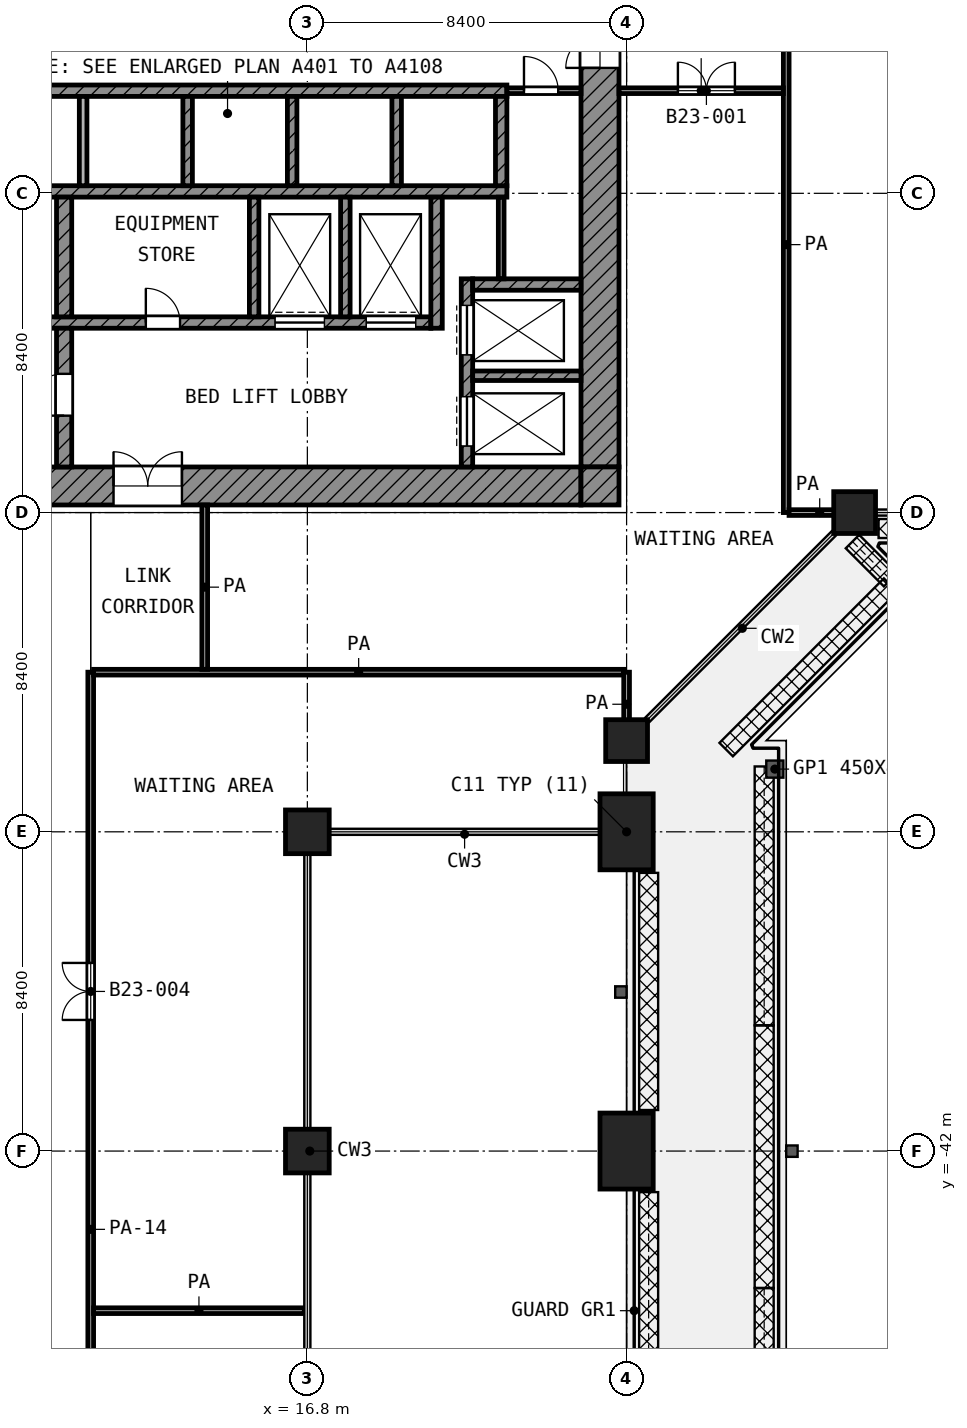
"""IFC4 building model, lengths in metres.
Left out: names, types, materials, properties, quantities, classifications, styles, units other than length and angle.
Written with IfcOpenShell. Run it as: python <this file> out.ifc"""

import sys

from ifc_helpers import new_model, si_unit, direction, frame, frame_2d, origin, origin_2d, place, context, subcontext, project, spatial, rectangle, extrude, element, fill, save


model = new_model("IFC4")
c1 = context("Model", 3, precision=1e-05, world=origin(), true_north=direction((0.0, 1.0)))
c2 = subcontext(c1, "Body", "Model", "MODEL_VIEW")
j1 = project(units=[si_unit("LENGTHUNIT", "METRE"), si_unit("PLANEANGLEUNIT", "RADIAN")], contexts=[c1])
p1 = place(None, origin())
s1 = spatial("IfcSite", under=j1, at=p1, CompositionType="ELEMENT")
p2 = place(p1, origin())
s2 = spatial("IfcBuilding", under=s1, at=p2, CompositionType="ELEMENT")
p3 = place(p2, frame((0.0, 0.0, 103.0)))
s3 = spatial("IfcBuildingStorey", under=s2, at=p3, CompositionType="ELEMENT", Elevation=103.0)
for number, where, z_axis, x_axis in (
    (1, (31.2, -25.2, 0.0), (0.0, 0.0, 1.0), (1.0, 0.0, 0.0)),
    (2, (25.2, -31.2, 0.0), (0.0, 0.0, 1.0), (1.0, 0.0, 0.0)),
):
    element("IfcColumn", number, at=place(p3, frame(where, z_axis=z_axis, x_axis=x_axis)), inside=s3, PredefinedType="COLUMN", context=c2, shape_type="SweptSolid", body=[
        extrude(rectangle(XDim=1.1, YDim=1.1, at=origin_2d()), origin(), (0.0, 0.0, 1.0), 4.2),
    ])
for number, where, z_axis, x_axis in (
    (3, (16.8, -33.6, 0.0), (0.0, 0.0, 1.0), (1.0, 0.0, 0.0)),
    (4, (16.8, -42.0, 0.0), (0.0, 0.0, 1.0), (1.0, 0.0, 0.0)),
):
    element("IfcColumn", number, at=place(p3, frame(where, z_axis=z_axis, x_axis=x_axis)), inside=s3, PredefinedType="COLUMN", context=c2, shape_type="SweptSolid", body=[
        extrude(rectangle(XDim=1.15, YDim=1.15, at=origin_2d()), origin(), (0.0, 0.0, 1.0), 4.2),
    ])
for number, where, z_axis, x_axis in (
    (5, (25.2, -42.0, 0.0), (0.0, 0.0, 1.0), (0.0, -1.0, 0.0)),
    (6, (25.2, -33.6, 0.0), (0.0, 0.0, 1.0), (0.0, -1.0, 0.0)),
):
    element("IfcColumn", number, at=place(p3, frame(where, z_axis=z_axis, x_axis=x_axis)), inside=s3, PredefinedType="COLUMN", context=c2, shape_type="SweptSolid", body=[
        extrude(rectangle(XDim=2.0, YDim=1.4, at=origin_2d()), origin(), (0.0, 0.0, 1.0), 4.2),
    ])
p4 = place(p3, frame((24.5, -24.0, 0.0), z_axis=(0.0, 0.0, 1.0), x_axis=(0.0, 1.0, 0.0)))
e7 = element("IfcWall", 7, at=p4, inside=s3, PredefinedType="SHEAR", context=c2, shape_type="SweptSolid", body=[
    extrude(rectangle(XDim=18.6, YDim=1.0, at=frame_2d((9.3, 0.0))), origin(), (0.0, 0.0, 1.0), 3.6),
])
p5 = place(p4, frame((10.5, 0.0, 0.0)))
e8 = element("IfcOpeningElement", 8, at=p5, cuts=e7, PredefinedType="OPENING", context=c2, shape_type="SweptSolid", body=[
    extrude(rectangle(XDim=1.8, YDim=2.1, at=frame_2d((0.9, 1.05))), frame((0.0, 0.51, 0.0), z_axis=(0.0, -1.0, 0.0), x_axis=(1.0, 0.0, 0.0)), (0.0, 0.0, 1.0), 1.02),
])
p6 = place(p3, frame((5.4, -24.5, 0.0), z_axis=(0.0, 0.0, 1.0), x_axis=(1.0, 0.0, 0.0)))
e9 = element("IfcWall", 9, at=p6, inside=s3, PredefinedType="SHEAR", context=c2, shape_type="SweptSolid", body=[
    extrude(rectangle(XDim=18.6, YDim=1.0, at=frame_2d((9.3, 0.0))), origin(), (0.0, 0.0, 1.0), 3.6),
])
p7 = place(p6, frame((6.3, 0.0, 0.0)))
e10 = element("IfcOpeningElement", 10, at=p7, cuts=e9, PredefinedType="OPENING", context=c2, shape_type="SweptSolid", body=[
    extrude(rectangle(XDim=1.8, YDim=2.1, at=frame_2d((0.9, 1.05))), frame((0.0, 0.51, 0.0), z_axis=(0.0, -1.0, 0.0), x_axis=(1.0, 0.0, 0.0)), (0.0, 0.0, 1.0), 1.02),
])
p8 = place(p3, frame((24.5, -25.0, 0.0), z_axis=(0.0, 0.0, 1.0), x_axis=(0.0, 1.0, 0.0)))
e11 = element("IfcWall", 11, at=p8, inside=s3, PredefinedType="SHEAR", context=c2, shape_type="SweptSolid", body=[
    extrude(rectangle(XDim=1.0, YDim=1.0, at=frame_2d((0.5, 0.0))), origin(), (0.0, 0.0, 1.0), 3.6),
])
for number, where, z_axis, x_axis in (
    (12, (5.4, -14.1, 0.0), (0.0, 0.0, 1.0), (1.0, 0.0, 0.0)),
    (13, (5.4, -16.75, 0.0), (0.0, 0.0, 1.0), (1.0, 0.0, 0.0)),
):
    element("IfcWall", number, at=place(p3, frame(where, z_axis=z_axis, x_axis=x_axis)), inside=s3, PredefinedType="SHEAR", context=c2, shape_type="SweptSolid", body=[
        extrude(rectangle(XDim=16.65, YDim=0.3, at=frame_2d((8.325, 0.0))), origin(), (0.0, 0.0, 1.0), 3.6),
    ])
p9 = place(p3, frame((5.4, -20.2, 0.0), z_axis=(0.0, 0.0, 1.0), x_axis=(1.0, 0.0, 0.0)))
e14 = element("IfcWall", 14, at=p9, inside=s3, PredefinedType="SHEAR", context=c2, shape_type="SweptSolid", body=[
    extrude(rectangle(XDim=14.65, YDim=0.3, at=frame_2d((7.325, 0.0))), origin(), (0.0, 0.0, 1.0), 3.6),
])
p10 = place(p9, frame((10.55, 0.0, 0.0)))
e15 = element("IfcOpeningElement", 15, at=p10, cuts=e14, PredefinedType="OPENING", context=c2, shape_type="SweptSolid", body=[
    extrude(rectangle(XDim=1.3, YDim=2.1, at=frame_2d((0.65, 1.05))), frame((0.0, 0.16, 0.0), z_axis=(0.0, -1.0, 0.0), x_axis=(1.0, 0.0, 0.0)), (0.0, 0.0, 1.0), 0.32),
])
p11 = place(p9, frame((12.95, 0.0, 0.0)))
e16 = element("IfcOpeningElement", 16, at=p11, cuts=e14, PredefinedType="OPENING", context=c2, shape_type="SweptSolid", body=[
    extrude(rectangle(XDim=1.3, YDim=2.1, at=frame_2d((0.65, 1.05))), frame((0.0, 0.16, 0.0), z_axis=(0.0, -1.0, 0.0), x_axis=(1.0, 0.0, 0.0)), (0.0, 0.0, 1.0), 0.32),
])
p12 = place(p9, frame((0.55, 0.0, 0.0)))
e17 = element("IfcOpeningElement", 17, at=p12, cuts=e14, PredefinedType="OPENING", context=c2, shape_type="SweptSolid", body=[
    extrude(rectangle(XDim=1.3, YDim=2.1, at=frame_2d((0.65, 1.05))), frame((0.0, 0.16, 0.0), z_axis=(0.0, -1.0, 0.0), x_axis=(1.0, 0.0, 0.0)), (0.0, 0.0, 1.0), 0.32),
])
p13 = place(p9, frame((2.95, 0.0, 0.0)))
e18 = element("IfcOpeningElement", 18, at=p13, cuts=e14, PredefinedType="OPENING", context=c2, shape_type="SweptSolid", body=[
    extrude(rectangle(XDim=1.3, YDim=2.1, at=frame_2d((0.65, 1.05))), frame((0.0, 0.16, 0.0), z_axis=(0.0, -1.0, 0.0), x_axis=(1.0, 0.0, 0.0)), (0.0, 0.0, 1.0), 0.32),
])
p14 = place(p9, frame((7.15, 0.0, 0.0)))
e19 = element("IfcOpeningElement", 19, at=p14, cuts=e14, PredefinedType="OPENING", context=c2, shape_type="SweptSolid", body=[
    extrude(rectangle(XDim=0.9, YDim=2.1, at=frame_2d((0.45, 1.05))), frame((0.0, 0.16, 0.0), z_axis=(0.0, -1.0, 0.0), x_axis=(1.0, 0.0, 0.0)), (0.0, 0.0, 1.0), 0.32),
])
p15 = place(p3, frame((10.4, -24.0, 0.0), z_axis=(0.0, 0.0, 1.0), x_axis=(0.0, 1.0, 0.0)))
e20 = element("IfcWall", 20, at=p15, inside=s3, PredefinedType="SHEAR", context=c2, shape_type="SweptSolid", body=[
    extrude(rectangle(XDim=3.65, YDim=0.4, at=frame_2d((1.825, 0.0))), origin(), (0.0, 0.0, 1.0), 3.6),
])
p16 = place(p15, frame((1.35, 0.0, 0.0)))
e21 = element("IfcOpeningElement", 21, at=p16, cuts=e20, PredefinedType="OPENING", context=c2, shape_type="SweptSolid", body=[
    extrude(rectangle(XDim=1.1, YDim=2.1, at=frame_2d((0.55, 1.05))), frame((0.0, 0.21, 0.0), z_axis=(0.0, -1.0, 0.0), x_axis=(1.0, 0.0, 0.0)), (0.0, 0.0, 1.0), 0.42),
])
p17 = place(p3, frame((10.4, -20.05, 0.0), z_axis=(0.0, 0.0, 1.0), x_axis=(0.0, 1.0, 0.0)))
e22 = element("IfcWall", 22, at=p17, inside=s3, PredefinedType="SHEAR", context=c2, shape_type="SweptSolid", body=[
    extrude(rectangle(XDim=3.15, YDim=0.4, at=frame_2d((1.575, 0.0))), origin(), (0.0, 0.0, 1.0), 3.6),
])
p18 = place(p3, frame((20.2, -20.35, 0.0), z_axis=(0.0, 0.0, 1.0), x_axis=(0.0, 1.0, 0.0)))
e23 = element("IfcWall", 23, at=p18, inside=s3, PredefinedType="SHEAR", context=c2, shape_type="SweptSolid", body=[
    extrude(rectangle(XDim=3.45, YDim=0.3, at=frame_2d((1.725, 0.0))), origin(), (0.0, 0.0, 1.0), 3.6),
])
p19 = place(p3, frame((21.9, -16.6, 0.0), z_axis=(0.0, 0.0, 1.0), x_axis=(0.0, 1.0, 0.0)))
e24 = element("IfcWall", 24, at=p19, inside=s3, PredefinedType="SHEAR", context=c2, shape_type="SweptSolid", body=[
    extrude(rectangle(XDim=2.35, YDim=0.3, at=frame_2d((1.175, 0.0))), origin(), (0.0, 0.0, 1.0), 3.6),
])
p20 = place(p3, frame((21.15, -19.2, 0.0), z_axis=(0.0, 0.0, 1.0), x_axis=(1.0, 0.0, 0.0)))
e25 = element("IfcWall", 25, at=p20, inside=s3, PredefinedType="SHEAR", context=c2, shape_type="SweptSolid", body=[
    extrude(rectangle(XDim=2.85, YDim=0.3, at=frame_2d((1.425, 0.0))), origin(), (0.0, 0.0, 1.0), 3.6),
])
p21 = place(p3, frame((21.0, -24.0, 0.0), z_axis=(0.0, 0.0, 1.0), x_axis=(0.0, 1.0, 0.0)))
e26 = element("IfcWall", 26, at=p21, inside=s3, PredefinedType="SHEAR", context=c2, shape_type="SweptSolid", body=[
    extrude(rectangle(XDim=4.95, YDim=0.3, at=frame_2d((2.475, 0.0))), origin(), (0.0, 0.0, 1.0), 3.6),
])
p22 = place(p21, frame((2.95, 0.0, 0.0)))
e27 = element("IfcOpeningElement", 27, at=p22, cuts=e26, PredefinedType="OPENING", context=c2, shape_type="SweptSolid", body=[
    extrude(rectangle(XDim=1.3, YDim=2.1, at=frame_2d((0.65, 1.05))), frame((0.0, 0.16, 0.0), z_axis=(0.0, -1.0, 0.0), x_axis=(1.0, 0.0, 0.0)), (0.0, 0.0, 1.0), 0.32),
])
p23 = place(p21, frame((0.55, 0.0, 0.0)))
e28 = element("IfcOpeningElement", 28, at=p23, cuts=e26, PredefinedType="OPENING", context=c2, shape_type="SweptSolid", body=[
    extrude(rectangle(XDim=1.3, YDim=2.1, at=frame_2d((0.65, 1.05))), frame((0.0, 0.16, 0.0), z_axis=(0.0, -1.0, 0.0), x_axis=(1.0, 0.0, 0.0)), (0.0, 0.0, 1.0), 0.32),
])
p24 = place(p3, frame((21.15, -21.6, 0.0), z_axis=(0.0, 0.0, 1.0), x_axis=(1.0, 0.0, 0.0)))
e29 = element("IfcWall", 29, at=p24, inside=s3, PredefinedType="SHEAR", context=c2, shape_type="SweptSolid", body=[
    extrude(rectangle(XDim=2.85, YDim=0.25, at=frame_2d((1.425, 0.0))), origin(), (0.0, 0.0, 1.0), 3.6),
])
for number, where, z_axis, x_axis in (
    (30, (15.4, -20.05, 0.0), (0.0, 0.0, 1.0), (0.0, 1.0, 0.0)),
    (31, (17.8, -20.05, 0.0), (0.0, 0.0, 1.0), (0.0, 1.0, 0.0)),
):
    element("IfcWall", number, at=place(p3, frame(where, z_axis=z_axis, x_axis=x_axis)), inside=s3, PredefinedType="SHEAR", context=c2, shape_type="SweptSolid", body=[
        extrude(rectangle(XDim=3.15, YDim=0.25, at=frame_2d((1.575, 0.0))), origin(), (0.0, 0.0, 1.0), 3.6),
    ])
p25 = place(p3, frame((10.9, -16.6, 0.0), z_axis=(0.0, 0.0, 1.0), x_axis=(0.0, 1.0, 0.0)))
e32 = element("IfcWall", 32, at=p25, inside=s3, PredefinedType="PARTITIONING", context=c2, shape_type="SweptSolid", body=[
    extrude(rectangle(XDim=2.35, YDim=0.2, at=frame_2d((1.175, 0.0))), origin(), (0.0, 0.0, 1.0), 3.6),
])
for number, where, z_axis, x_axis in (
    (33, (13.65, -16.6, 0.0), (0.0, 0.0, 1.0), (0.0, 1.0, 0.0)),
    (34, (16.4, -16.6, 0.0), (0.0, 0.0, 1.0), (0.0, 1.0, 0.0)),
    (35, (19.15, -16.6, 0.0), (0.0, 0.0, 1.0), (0.0, 1.0, 0.0)),
):
    element("IfcWall", number, at=place(p3, frame(where, z_axis=z_axis, x_axis=x_axis)), inside=s3, PredefinedType="SHEAR", context=c2, shape_type="SweptSolid", body=[
        extrude(rectangle(XDim=2.35, YDim=0.25, at=frame_2d((1.175, 0.0))), origin(), (0.0, 0.0, 1.0), 3.6),
    ])
p26 = place(p3, frame((21.9, -19.05, 0.0), z_axis=(0.0, 0.0, 1.0), x_axis=(0.0, 1.0, 0.0)))
e36 = element("IfcWall", 36, at=p26, inside=s3, PredefinedType="PARTITIONING", context=c2, shape_type="SweptSolid", body=[
    extrude(rectangle(XDim=2.15, YDim=0.15, at=frame_2d((1.075, 0.0))), origin(), (0.0, 0.0, 1.0), 3.6),
])
p27 = place(p3, frame((22.05, -14.1, 0.0), z_axis=(0.0, 0.0, 1.0), x_axis=(1.0, 0.0, 0.0)))
e37 = element("IfcWall", 37, at=p27, inside=s3, PredefinedType="PARTITIONING", context=c2, shape_type="SweptSolid", body=[
    extrude(rectangle(XDim=1.95, YDim=0.15, at=frame_2d((0.975, 0.0))), origin(), (0.0, 0.0, 1.0), 3.6),
])
p28 = place(p27, frame((0.45, 0.0, 0.0)))
e38 = element("IfcOpeningElement", 38, at=p28, cuts=e37, PredefinedType="OPENING", context=c2, shape_type="SweptSolid", body=[
    extrude(rectangle(XDim=0.9, YDim=2.1, at=frame_2d((0.45, 1.05))), frame((0.0, 0.085, 0.0), z_axis=(0.0, -1.0, 0.0), x_axis=(1.0, 0.0, 0.0)), (0.0, 0.0, 1.0), 0.17),
])
p29 = place(p3, frame((11.175, -46.2, 0.0), z_axis=(0.0, 0.0, 1.0), x_axis=(1.0, 0.0, 0.0)))
e39 = element("IfcWall", 39, at=p29, inside=s3, PredefinedType="PARTITIONING", context=c2, shape_type="SweptSolid", body=[
    extrude(rectangle(XDim=5.545, YDim=0.15, at=frame_2d((2.772, 0.0))), origin(), (0.0, 0.0, 1.0), 3.6),
])
p30 = place(p3, frame((11.175, -29.4, 0.0), z_axis=(0.0, 0.0, 1.0), x_axis=(1.0, 0.0, 0.0)))
e40 = element("IfcWall", 40, at=p30, inside=s3, PredefinedType="PARTITIONING", context=c2, shape_type="SweptSolid", body=[
    extrude(rectangle(XDim=13.95, YDim=0.15, at=frame_2d((6.975, 0.0))), origin(), (0.0, 0.0, 1.0), 3.6),
])
p31 = place(p3, frame((29.475, -25.2, 0.0), z_axis=(0.0, 0.0, 1.0), x_axis=(1.0, 0.0, 0.0)))
e41 = element("IfcWall", 41, at=p31, inside=s3, PredefinedType="PARTITIONING", context=c2, shape_type="SweptSolid", body=[
    extrude(rectangle(XDim=1.612, YDim=0.15, at=frame_2d((0.806, 0.0))), origin(), (0.0, 0.0, 1.0), 3.6),
])
p32 = place(p3, frame((25.0, -14.1, 0.0), z_axis=(0.0, 0.0, 1.0), x_axis=(1.0, 0.0, 0.0)))
e42 = element("IfcWall", 42, at=p32, inside=s3, PredefinedType="PARTITIONING", context=c2, shape_type="SweptSolid", body=[
    extrude(rectangle(XDim=4.325, YDim=0.15, at=frame_2d((2.163, 0.0))), origin(), (0.0, 0.0, 1.0), 3.6),
])
p33 = place(p32, frame((1.55, 0.0, 0.0)))
e43 = element("IfcOpeningElement", 43, at=p33, cuts=e42, PredefinedType="OPENING", context=c2, shape_type="SweptSolid", body=[
    extrude(rectangle(XDim=1.5, YDim=2.1, at=frame_2d((0.75, 1.05))), frame((0.0, 0.085, 0.0), z_axis=(0.0, -1.0, 0.0), x_axis=(1.0, 0.0, 0.0)), (0.0, 0.0, 1.0), 0.17),
])
p34 = place(p3, frame((11.1, -58.72, 0.0), z_axis=(0.0, 0.0, 1.0), x_axis=(0.0, 1.0, 0.0)))
e44 = element("IfcWall", 44, at=p34, inside=s3, PredefinedType="PARTITIONING", context=c2, shape_type="SweptSolid", body=[
    extrude(rectangle(XDim=29.32, YDim=0.15, at=frame_2d((14.66, 0.0))), origin(), (0.0, 0.0, 1.0), 2.7),
])
p35 = place(p34, frame((20.17, 0.0, 0.0)))
e45 = element("IfcOpeningElement", 45, at=p35, cuts=e44, PredefinedType="OPENING", context=c2, shape_type="SweptSolid", body=[
    extrude(rectangle(XDim=1.5, YDim=2.1, at=frame_2d((0.75, 1.05))), frame((0.0, 0.085, 0.0), z_axis=(0.0, -1.0, 0.0), x_axis=(1.0, 0.0, 0.0)), (0.0, 0.0, 1.0), 0.17),
])
p36 = place(p34, frame((9.92, 0.0, 0.0)))
e46 = element("IfcOpeningElement", 46, at=p36, cuts=e44, PredefinedType="OPENING", context=c2, shape_type="SweptSolid", body=[
    extrude(rectangle(XDim=1.0, YDim=2.1, at=frame_2d((0.5, 1.05))), frame((0.0, 0.085, 0.0), z_axis=(0.0, -1.0, 0.0), x_axis=(1.0, 0.0, 0.0)), (0.0, 0.0, 1.0), 0.17),
])
p37 = place(p34, frame((5.57, 0.0, 0.0)))
e47 = element("IfcOpeningElement", 47, at=p37, cuts=e44, PredefinedType="OPENING", context=c2, shape_type="SweptSolid", body=[
    extrude(rectangle(XDim=1.0, YDim=2.1, at=frame_2d((0.5, 1.05))), frame((0.0, 0.085, 0.0), z_axis=(0.0, -1.0, 0.0), x_axis=(1.0, 0.0, 0.0)), (0.0, 0.0, 1.0), 0.17),
])
p38 = place(p34, frame((1.37, 0.0, 0.0)))
e48 = element("IfcOpeningElement", 48, at=p38, cuts=e44, PredefinedType="OPENING", context=c2, shape_type="SweptSolid", body=[
    extrude(rectangle(XDim=1.0, YDim=2.1, at=frame_2d((0.5, 1.05))), frame((0.0, 0.085, 0.0), z_axis=(0.0, -1.0, 0.0), x_axis=(1.0, 0.0, 0.0)), (0.0, 0.0, 1.0), 0.17),
])
p39 = place(p3, frame((14.1, -29.325, 0.0), z_axis=(0.0, 0.0, 1.0), x_axis=(0.0, 1.0, 0.0)))
e49 = element("IfcWall", 49, at=p39, inside=s3, PredefinedType="PARTITIONING", context=c2, shape_type="SweptSolid", body=[
    extrude(rectangle(XDim=4.325, YDim=0.15, at=frame_2d((2.163, 0.0))), origin(), (0.0, 0.0, 1.0), 3.6),
])
p40 = place(p3, frame((25.2, -31.087, 0.0), z_axis=(0.0, 0.0, 1.0), x_axis=(0.0, 1.0, 0.0)))
e50 = element("IfcWall", 50, at=p40, inside=s3, PredefinedType="PARTITIONING", context=c2, shape_type="SweptSolid", body=[
    extrude(rectangle(XDim=1.687, YDim=0.15, at=frame_2d((0.844, 0.0))), origin(), (0.0, 0.0, 1.0), 3.6),
])
p41 = place(p3, frame((29.4, -25.2, 0.0), z_axis=(0.0, 0.0, 1.0), x_axis=(0.0, 1.0, 0.0)))
e51 = element("IfcWall", 51, at=p41, inside=s3, PredefinedType="PARTITIONING", context=c2, shape_type="SweptSolid", body=[
    extrude(rectangle(XDim=14.1, YDim=0.15, at=frame_2d((7.05, 0.0))), origin(), (0.0, 0.0, 1.0), 3.6),
])
p42 = place(p22, origin())
e52 = element("IfcDoor", 52, at=p42, inside=s3, OperationType="DOUBLE_DOOR_SLIDING", PredefinedType="DOOR", context=c2, shape_type="SweptSolid", body=[
    extrude(rectangle(XDim=1.3, YDim=2.1, at=frame_2d((0.65, 1.05))), frame((0.0, 0.025, 0.0), z_axis=(0.0, -1.0, 0.0), x_axis=(1.0, 0.0, 0.0)), (0.0, 0.0, 1.0), 0.05),
])
fill(e27, e52)
p43 = place(p23, origin())
e53 = element("IfcDoor", 53, at=p43, inside=s3, OperationType="DOUBLE_DOOR_SLIDING", PredefinedType="DOOR", context=c2, shape_type="SweptSolid", body=[
    extrude(rectangle(XDim=1.3, YDim=2.1, at=frame_2d((0.65, 1.05))), frame((0.0, 0.025, 0.0), z_axis=(0.0, -1.0, 0.0), x_axis=(1.0, 0.0, 0.0)), (0.0, 0.0, 1.0), 0.05),
])
fill(e28, e53)
p44 = place(p10, origin())
e54 = element("IfcDoor", 54, at=p44, inside=s3, OperationType="DOUBLE_DOOR_SLIDING", PredefinedType="DOOR", context=c2, shape_type="SweptSolid", body=[
    extrude(rectangle(XDim=1.3, YDim=2.1, at=frame_2d((0.65, 1.05))), frame((0.0, 0.025, 0.0), z_axis=(0.0, -1.0, 0.0), x_axis=(1.0, 0.0, 0.0)), (0.0, 0.0, 1.0), 0.05),
])
fill(e15, e54)
p45 = place(p11, origin())
e55 = element("IfcDoor", 55, at=p45, inside=s3, OperationType="DOUBLE_DOOR_SLIDING", PredefinedType="DOOR", context=c2, shape_type="SweptSolid", body=[
    extrude(rectangle(XDim=1.3, YDim=2.1, at=frame_2d((0.65, 1.05))), frame((0.0, 0.025, 0.0), z_axis=(0.0, -1.0, 0.0), x_axis=(1.0, 0.0, 0.0)), (0.0, 0.0, 1.0), 0.05),
])
fill(e16, e55)
p46 = place(p16, origin())
e56 = element("IfcDoor", 56, at=p46, inside=s3, OperationType="SINGLE_SWING_LEFT", PredefinedType="DOOR", context=c2, shape_type="SweptSolid", body=[
    extrude(rectangle(XDim=1.1, YDim=2.1, at=frame_2d((0.55, 1.05))), frame((0.0, 0.025, 0.0), z_axis=(0.0, -1.0, 0.0), x_axis=(1.0, 0.0, 0.0)), (0.0, 0.0, 1.0), 0.05),
])
fill(e21, e56)
p47 = place(p5, origin())
e57 = element("IfcDoor", 57, at=p47, inside=s3, OperationType="DOUBLE_DOOR_SINGLE_SWING", PredefinedType="DOOR", context=c2, shape_type="SweptSolid", body=[
    extrude(rectangle(XDim=1.8, YDim=2.1, at=frame_2d((0.9, 1.05))), frame((0.0, 0.025, 0.0), z_axis=(0.0, -1.0, 0.0), x_axis=(1.0, 0.0, 0.0)), (0.0, 0.0, 1.0), 0.05),
])
fill(e8, e57)
p48 = place(p7, origin())
e58 = element("IfcDoor", 58, at=p48, inside=s3, OperationType="DOUBLE_DOOR_SINGLE_SWING", PredefinedType="DOOR", context=c2, shape_type="SweptSolid", body=[
    extrude(rectangle(XDim=1.8, YDim=2.1, at=frame_2d((0.9, 1.05))), frame((0.0, 0.025, 0.0), z_axis=(0.0, -1.0, 0.0), x_axis=(1.0, 0.0, 0.0)), (0.0, 0.0, 1.0), 0.05),
])
fill(e10, e58)
p49 = place(p28, origin())
e59 = element("IfcDoor", 59, at=p49, inside=s3, OperationType="SINGLE_SWING_LEFT", PredefinedType="DOOR", context=c2, shape_type="SweptSolid", body=[
    extrude(rectangle(XDim=0.9, YDim=2.1, at=frame_2d((0.45, 1.05))), frame((0.0, 0.025, 0.0), z_axis=(0.0, -1.0, 0.0), x_axis=(1.0, 0.0, 0.0)), (0.0, 0.0, 1.0), 0.05),
])
fill(e38, e59)
p50 = place(p14, origin())
e60 = element("IfcDoor", 60, at=p50, inside=s3, OperationType="SINGLE_SWING_LEFT", PredefinedType="DOOR", context=c2, shape_type="SweptSolid", body=[
    extrude(rectangle(XDim=0.9, YDim=2.1, at=frame_2d((0.45, 1.05))), frame((0.0, 0.025, 0.0), z_axis=(0.0, -1.0, 0.0), x_axis=(1.0, 0.0, 0.0)), (0.0, 0.0, 1.0), 0.05),
])
fill(e19, e60)
p51 = place(p33, origin())
e61 = element("IfcDoor", 61, at=p51, inside=s3, OperationType="DOUBLE_DOOR_SINGLE_SWING", PredefinedType="DOOR", context=c2, shape_type="SweptSolid", body=[
    extrude(rectangle(XDim=1.5, YDim=2.1, at=frame_2d((0.75, 1.05))), frame((0.0, 0.025, 0.0), z_axis=(0.0, -1.0, 0.0), x_axis=(1.0, 0.0, 0.0)), (0.0, 0.0, 1.0), 0.05),
])
fill(e43, e61)
p52 = place(p35, origin())
e62 = element("IfcDoor", 62, at=p52, inside=s3, OperationType="DOUBLE_DOOR_SINGLE_SWING", PredefinedType="DOOR", context=c2, shape_type="SweptSolid", body=[
    extrude(rectangle(XDim=1.5, YDim=2.1, at=frame_2d((0.75, 1.05))), frame((0.0, 0.025, 0.0), z_axis=(0.0, -1.0, 0.0), x_axis=(1.0, 0.0, 0.0)), (0.0, 0.0, 1.0), 0.05),
])
fill(e45, e62)
save(model, sys.argv[1])
